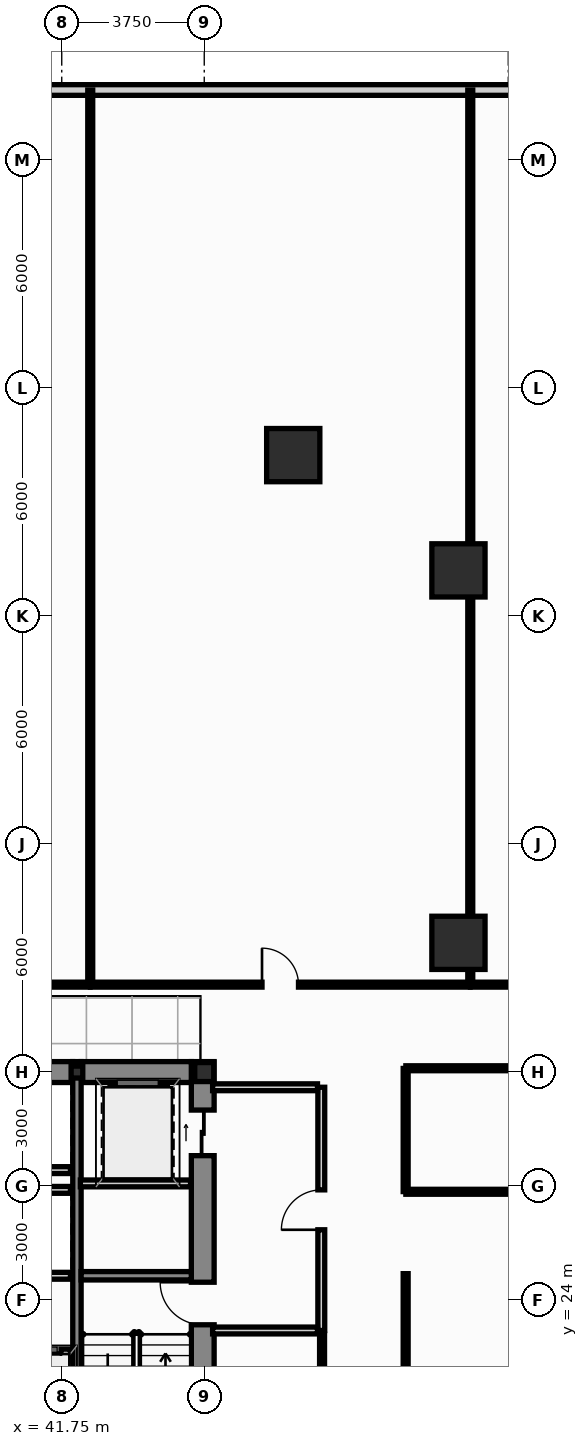
"""IFC4 building model, lengths in metres.
Left out: names, types, materials, properties, quantities, classifications, styles, units other than length and angle.
Written with IfcOpenShell. Run it as: python <this file> out.ifc"""

import sys

from ifc_helpers import new_model, si_unit, direction, frame, frame_2d, origin, origin_2d, place, context, subcontext, project, spatial, rectangle, hollow_rectangle, i_section, extrude, source, transform, mapped, element, fill, save


model = new_model("IFC4")
c1 = context("Model", 3, precision=1e-05, world=origin(), true_north=direction((0.0, 1.0)))
c2 = subcontext(c1, "Body", "Model", "MODEL_VIEW")
j1 = project(units=[si_unit("LENGTHUNIT", "METRE"), si_unit("PLANEANGLEUNIT", "RADIAN")], contexts=[c1])
p1 = place(None, origin())
s1 = spatial("IfcSite", under=j1, at=p1, CompositionType="ELEMENT")
p2 = place(p1, origin())
s2 = spatial("IfcBuilding", under=s1, at=p2, CompositionType="ELEMENT")
p3 = place(p2, frame((0.0, 0.0, 5.4)))
s3 = spatial("IfcBuildingStorey", under=s2, at=p3, CompositionType="ELEMENT", Elevation=5.4)
m1 = source(origin(), c2, "Body", "SweptSolid", [
    extrude(i_section(OverallWidth=0.5, OverallDepth=0.5, WebThickness=0.028, FlangeThickness=0.04, at=origin_2d()), origin(), (0.0, 0.0, 1.0), 4.8),
])
p4 = place(p3, frame((45.5, 30.0, 0.0), z_axis=(0.0, 0.0, 1.0), x_axis=(1.0, 0.0, 0.0)))
e1 = element("IfcColumn", 1, at=p4, inside=s3, PredefinedType="COLUMN", context=c2, shape_type="MappedRepresentation", body=[
    mapped(m1, transform((0.0, 0.0, 0.0), scale=1.0)),
])
m2 = source(origin(), c2, "Body", "SweptSolid", [
    extrude(i_section(OverallWidth=0.307, OverallDepth=0.315, WebThickness=0.012, FlangeThickness=0.019, at=origin_2d()), origin(), (0.0, 0.0, 1.0), 4.8),
])
p5 = place(p3, frame((42.15, 30.0, 0.0), z_axis=(0.0, 0.0, 1.0), x_axis=(1.0, 0.0, 0.0)))
e2 = element("IfcColumn", 2, at=p5, inside=s3, PredefinedType="COLUMN", context=c2, shape_type="MappedRepresentation", body=[
    mapped(m2, transform((0.0, 0.0, 0.0), scale=1.0)),
])
p6 = place(p3, frame((45.46, 16.85, 0.0), z_axis=(0.0, 0.0, 1.0), x_axis=(0.0, 1.0, 0.0)))
e3 = element("IfcWall", 3, at=p6, inside=s3, PredefinedType="SHEAR", context=c2, shape_type="SweptSolid", body=[
    extrude(rectangle(XDim=13.425, YDim=0.6, at=frame_2d((6.712, 0.0))), origin(), (0.0, 0.0, 1.0), 4.8),
])
p7 = place(p6, frame((6.5, 0.0, 0.0)))
e4 = element("IfcOpeningElement", 4, at=p7, cuts=e3, PredefinedType="OPENING", context=c2, shape_type="SweptSolid", body=[
    extrude(rectangle(XDim=1.12, YDim=2.15, at=frame_2d((0.56, 1.075))), frame((0.0, 0.312, 0.0), z_axis=(0.0, -1.0, 0.0), x_axis=(1.0, 0.0, 0.0)), (0.0, 0.0, 1.0), 0.624),
])
p8 = place(p6, frame((10.95, 0.0, 0.0)))
e5 = element("IfcOpeningElement", 5, at=p8, cuts=e3, PredefinedType="OPENING", context=c2, shape_type="SweptSolid", body=[
    extrude(rectangle(XDim=1.2, YDim=2.2, at=frame_2d((0.6, 1.1))), frame((0.0, 0.312, 0.0), z_axis=(0.0, -1.0, 0.0), x_axis=(1.0, 0.0, 0.0)), (0.0, 0.0, 1.0), 0.624),
])
p9 = place(p3, frame((40.16, 30.0, 0.0), z_axis=(0.0, 0.0, 1.0), x_axis=(1.0, 0.0, 0.0)))
e6 = element("IfcWall", 6, at=p9, inside=s3, PredefinedType="SHEAR", context=c2, shape_type="SweptSolid", body=[
    extrude(rectangle(XDim=1.88, YDim=0.55, at=frame_2d((0.94, 0.0))), origin(), (0.0, 0.0, 1.0), 4.8),
])
p10 = place(p3, frame((42.26, 30.0, 0.0), z_axis=(0.0, 0.0, 1.0), x_axis=(1.0, 0.0, 0.0)))
e7 = element("IfcWall", 7, at=p10, inside=s3, PredefinedType="SHEAR", context=c2, shape_type="SweptSolid", body=[
    extrude(rectangle(XDim=2.9, YDim=0.55, at=frame_2d((1.45, 0.0))), origin(), (0.0, 0.0, 1.0), 4.8),
])
p11 = place(p3, frame((42.15, 16.85, 0.0), z_axis=(0.0, 0.0, 1.0), x_axis=(0.0, 1.0, 0.0)))
e8 = element("IfcWall", 8, at=p11, inside=s3, PredefinedType="SHEAR", context=c2, shape_type="SweptSolid", body=[
    extrude(rectangle(XDim=13.425, YDim=0.22, at=frame_2d((6.712, 0.0))), origin(), (0.0, 0.0, 1.0), 4.8),
])
p12 = place(p3, frame((42.26, 24.64, 0.0), z_axis=(0.0, 0.0, 1.0), x_axis=(1.0, 0.0, 0.0)))
e9 = element("IfcWall", 9, at=p12, inside=s3, PredefinedType="SHEAR", context=c2, shape_type="SweptSolid", body=[
    extrude(rectangle(XDim=2.9, YDim=0.22, at=frame_2d((1.45, 0.0))), origin(), (0.0, 0.0, 1.0), 4.8),
])
m3 = source(origin(), c2, "Body", "SweptSolid", [
    extrude(hollow_rectangle(XDim=1.4, YDim=1.4, WallThickness=0.08, at=origin_2d()), origin(), (0.0, 0.0, 1.0), 4.802),
])
p13 = place(p3, frame((47.842, 46.233, 0.0), z_axis=(-0.023847509135, 0.001779664861, 0.999714023659), x_axis=(-0.074419924822, -0.99722699261, 0.0)))
e10 = element("IfcColumn", 10, at=p13, inside=s3, PredefinedType="COLUMN", context=c2, shape_type="MappedRepresentation", body=[
    mapped(m3, transform((0.0, 0.0, 0.0), scale=1.0)),
])
m4 = source(origin(), c2, "Body", "SweptSolid", [
    extrude(hollow_rectangle(XDim=1.4, YDim=1.4, WallThickness=0.08, at=origin_2d()), origin(), (0.0, 0.0, 1.0), 4.8),
])
for number, where, z_axis, x_axis in (
    (11, (52.189, 33.4, 0.0), (0.0, 0.0, 1.0), (1.0, 0.0, 0.0)),
    (12, (52.189, 43.2, 0.0), (0.0, 0.0, 1.0), (1.0, 0.0, 0.0)),
):
    element("IfcColumn", number, at=place(p3, frame(where, z_axis=z_axis, x_axis=x_axis)), inside=s3, PredefinedType="COLUMN", context=c2, shape_type="MappedRepresentation", body=[
        mapped(m4, transform((0.0, 0.0, 0.0), scale=1.0)),
    ])
p14 = place(p3, frame((5.086, 55.84, 0.0), z_axis=(0.0, 0.0, 1.0), x_axis=(1.0, 0.0, 0.0)))
e13 = element("IfcWall", 13, at=p14, inside=s3, PredefinedType="STANDARD", context=c2, shape_type="SweptSolid", body=[
    extrude(rectangle(XDim=71.828, YDim=0.28, at=frame_2d((35.914, 0.0))), origin(), (0.0, 0.0, 1.0), 4.48),
])
p15 = place(p3, frame((40.28, 22.62, 0.0), z_axis=(0.0, 0.0, 1.0), x_axis=(1.0, 0.0, 0.0)))
e14 = element("IfcWall", 14, at=p15, inside=s3, PredefinedType="PARTITIONING", context=c2, shape_type="SweptSolid", body=[
    extrude(rectangle(XDim=1.7, YDim=0.18, at=frame_2d((0.85, 0.0))), origin(), (0.0, 0.0, 1.0), 4.48),
])
p16 = place(p15, frame((0.35, 0.0, 0.0)))
e15 = element("IfcOpeningElement", 15, at=p16, cuts=e14, PredefinedType="OPENING", context=c2, shape_type="SweptSolid", body=[
    extrude(rectangle(XDim=1.1, YDim=2.2, at=frame_2d((0.55, 1.1))), frame((0.0, 0.102, 0.0), z_axis=(0.0, -1.0, 0.0), x_axis=(1.0, 0.0, 0.0)), (0.0, 0.0, 1.0), 0.204),
])
p17 = place(p3, frame((40.28, 26.9, 0.0), z_axis=(0.0, 0.0, 1.0), x_axis=(1.0, 0.0, 0.0)))
e16 = element("IfcWall", 16, at=p17, inside=s3, PredefinedType="PARTITIONING", context=c2, shape_type="SweptSolid", body=[
    extrude(rectangle(XDim=1.7, YDim=0.18, at=frame_2d((0.85, 0.0))), origin(), (0.0, 0.0, 1.0), 4.48),
])
p18 = place(p3, frame((40.2, 24.64, 0.0), z_axis=(0.0, 0.0, 1.0), x_axis=(1.0, 0.0, 0.0)))
e17 = element("IfcWall", 17, at=p18, inside=s3, PredefinedType="PARTITIONING", context=c2, shape_type="SweptSolid", body=[
    extrude(rectangle(XDim=1.78, YDim=0.18, at=frame_2d((0.89, 0.0))), origin(), (0.0, 0.0, 1.0), 4.48),
])
p19 = place(p3, frame((40.22, 27.42, 0.0), z_axis=(0.0, 0.0, 1.0), x_axis=(1.0, 0.0, 0.0)))
e18 = element("IfcWall", 18, at=p19, inside=s3, PredefinedType="PARTITIONING", context=c2, shape_type="SweptSolid", body=[
    extrude(rectangle(XDim=1.76, YDim=0.18, at=frame_2d((0.88, 0.0))), origin(), (0.0, 0.0, 1.0), 4.48),
])
p20 = place(p3, frame((48.58, 23.2, 0.0), z_axis=(0.0, 0.0, 1.0), x_axis=(0.0, 1.0, 0.0)))
e19 = element("IfcWall", 19, at=p20, inside=s3, PredefinedType="PARTITIONING", context=c2, shape_type="SweptSolid", body=[
    extrude(rectangle(XDim=6.4, YDim=0.18, at=frame_2d((3.2, 0.0))), origin(), (0.0, 0.0, 1.0), 4.48),
])
p21 = place(p20, frame((2.65, 0.0, 0.0)))
e20 = element("IfcOpeningElement", 20, at=p21, cuts=e19, PredefinedType="OPENING", context=c2, shape_type="SweptSolid", body=[
    extrude(rectangle(XDim=1.05, YDim=2.15, at=frame_2d((0.525, 1.075))), frame((0.0, 0.102, 0.0), z_axis=(0.0, -1.0, 0.0), x_axis=(1.0, 0.0, 0.0)), (0.0, 0.0, 1.0), 0.204),
])
p22 = place(p3, frame((45.72, 23.2, 0.0), z_axis=(0.0, 0.0, 1.0), x_axis=(1.0, 0.0, 0.0)))
e21 = element("IfcWall", 21, at=p22, inside=s3, PredefinedType="PARTITIONING", context=c2, shape_type="SweptSolid", body=[
    extrude(rectangle(XDim=2.76, YDim=0.18, at=frame_2d((1.38, 0.0))), origin(), (0.0, 0.0, 1.0), 4.48),
])
p23 = place(p3, frame((45.72, 29.6, 0.0), z_axis=(0.0, 0.0, 1.0), x_axis=(1.0, 0.0, 0.0)))
e22 = element("IfcWall", 22, at=p23, inside=s3, PredefinedType="PARTITIONING", context=c2, shape_type="SweptSolid", body=[
    extrude(rectangle(XDim=2.76, YDim=0.18, at=frame_2d((1.38, 0.0))), origin(), (0.0, 0.0, 1.0), 3.854),
])
p24 = place(p3, frame((42.24, 27.07, 0.0), z_axis=(0.0, 0.0, 1.0), x_axis=(1.0, 0.0, 0.0)))
e23 = element("IfcWall", 23, at=p24, inside=s3, PredefinedType="PARTITIONING", context=c2, shape_type="SweptSolid", body=[
    extrude(rectangle(XDim=2.9, YDim=0.18, at=frame_2d((1.45, 0.0))), origin(), (0.0, 0.0, 1.0), 4.48),
])
p25 = place(p3, frame((52.5, 32.305, 0.0), z_axis=(0.0, 0.0, 1.0), x_axis=(0.0, 1.0, 0.0)))
e24 = element("IfcWall", 24, at=p25, inside=s3, PredefinedType="PARTITIONING", context=c2, shape_type="SweptSolid", body=[
    extrude(rectangle(XDim=23.535, YDim=0.13, at=frame_2d((11.768, 0.0))), origin(), (0.0, 0.0, 1.0), 3.465),
])
p26 = place(p3, frame((42.5, 32.305, 0.0), z_axis=(0.0, 0.0, 1.0), x_axis=(0.0, 1.0, 0.0)))
e25 = element("IfcWall", 25, at=p26, inside=s3, PredefinedType="PARTITIONING", context=c2, shape_type="SweptSolid", body=[
    extrude(rectangle(XDim=23.535, YDim=0.13, at=frame_2d((11.768, 0.0))), origin(), (0.0, 0.0, 1.0), 4.48),
])
p27 = place(p3, frame((26.205, 32.3, 0.0), z_axis=(0.0, 0.0, 1.0), x_axis=(1.0, 0.0, 0.0)))
e26 = element("IfcWall", 26, at=p27, inside=s3, PredefinedType="PARTITIONING", context=c2, shape_type="SweptSolid", body=[
    extrude(rectangle(XDim=16.29, YDim=0.13, at=frame_2d((8.145, 0.0))), origin(), (0.0, 0.0, 1.0), 4.48),
])
p28 = place(p27, frame((7.665, 0.0, 0.0)))
e27 = element("IfcOpeningElement", 27, at=p28, cuts=e26, PredefinedType="OPENING", context=c2, shape_type="SweptSolid", body=[
    extrude(rectangle(XDim=0.96, YDim=2.15, at=frame_2d((0.48, 1.075))), frame((0.0, 0.077, 0.0), z_axis=(0.0, -1.0, 0.0), x_axis=(1.0, 0.0, 0.0)), (0.0, 0.0, 1.0), 0.154),
])
p29 = place(p3, frame((61.495, 30.1, 0.0), z_axis=(0.0, 0.0, 1.0), x_axis=(-1.0, 0.0, 0.0)))
e28 = element("IfcWall", 28, at=p29, inside=s3, PredefinedType="PARTITIONING", context=c2, shape_type="SweptSolid", body=[
    extrude(rectangle(XDim=10.69, YDim=0.13, at=frame_2d((5.345, 0.0))), origin(), (0.0, 0.0, 1.0), 3.854),
])
p30 = place(p29, frame((5.22, 0.0, 0.0)))
e29 = element("IfcOpeningElement", 29, at=p30, cuts=e28, PredefinedType="OPENING", context=c2, shape_type="SweptSolid", body=[
    extrude(rectangle(XDim=0.96, YDim=2.15, at=frame_2d((0.48, 1.075))), frame((0.0, 0.077, 0.0), z_axis=(0.0, -1.0, 0.0), x_axis=(1.0, 0.0, 0.0)), (0.0, 0.0, 1.0), 0.154),
])
p31 = place(p3, frame((42.505, 32.3, 0.0), z_axis=(0.0, 0.0, 1.0), x_axis=(1.0, 0.0, 0.0)))
e30 = element("IfcWall", 30, at=p31, inside=s3, PredefinedType="PARTITIONING", context=c2, shape_type="SweptSolid", body=[
    extrude(rectangle(XDim=9.99, YDim=0.13, at=frame_2d((4.995, 0.0))), origin(), (0.0, 0.0, 1.0), 4.48),
])
p32 = place(p31, frame((4.515, 0.0, 0.0)))
e31 = element("IfcOpeningElement", 31, at=p32, cuts=e30, PredefinedType="OPENING", context=c2, shape_type="SweptSolid", body=[
    extrude(rectangle(XDim=0.96, YDim=2.15, at=frame_2d((0.48, 1.075))), frame((0.0, 0.077, 0.0), z_axis=(0.0, -1.0, 0.0), x_axis=(1.0, 0.0, 0.0)), (0.0, 0.0, 1.0), 0.154),
])
p33 = place(p3, frame((52.505, 32.3, 0.0), z_axis=(0.0, 0.0, 1.0), x_axis=(1.0, 0.0, 0.0)))
e32 = element("IfcWall", 32, at=p33, inside=s3, PredefinedType="PARTITIONING", context=c2, shape_type="SweptSolid", body=[
    extrude(rectangle(XDim=8.99, YDim=0.13, at=frame_2d((4.495, 0.0))), origin(), (0.0, 0.0, 1.0), 4.48),
])
p34 = place(p3, frame((48.6, 14.355, 0.0), z_axis=(0.0, 0.0, 1.0), x_axis=(0.0, 1.0, 0.0)))
e33 = element("IfcWall", 33, at=p34, inside=s3, PredefinedType="PARTITIONING", context=c2, shape_type="SweptSolid", body=[
    extrude(rectangle(XDim=8.75, YDim=0.13, at=frame_2d((4.375, 0.0))), origin(), (0.0, 0.0, 1.0), 4.48),
])
p35 = place(p3, frame((50.805, 26.85, 0.0), z_axis=(0.0, 0.0, 1.0), x_axis=(1.0, 0.0, 0.0)))
e34 = element("IfcWall", 34, at=p35, inside=s3, PredefinedType="PARTITIONING", context=c2, shape_type="SweptSolid", body=[
    extrude(rectangle(XDim=8.49, YDim=0.13, at=frame_2d((4.245, 0.0))), origin(), (0.0, 0.0, 1.0), 4.48),
])
p36 = place(p3, frame((50.8, 24.695, 0.0), z_axis=(0.0, 0.0, 1.0), x_axis=(0.0, -1.0, 0.0)))
e35 = element("IfcWall", 35, at=p36, inside=s3, PredefinedType="PARTITIONING", context=c2, shape_type="SweptSolid", body=[
    extrude(rectangle(XDim=5.19, YDim=0.13, at=frame_2d((2.595, 0.0))), origin(), (0.0, 0.0, 1.0), 4.48),
])
p37 = place(p3, frame((50.8, 30.095, 0.0), z_axis=(0.0, 0.0, 1.0), x_axis=(0.0, -1.0, 0.0)))
e36 = element("IfcWall", 36, at=p37, inside=s3, PredefinedType="PARTITIONING", context=c2, shape_type="SweptSolid", body=[
    extrude(rectangle(XDim=3.24, YDim=0.13, at=frame_2d((1.62, 0.0))), origin(), (0.0, 0.0, 1.0), 4.48),
])
p38 = place(p7, origin())
e37 = element("IfcDoor", 37, at=p38, inside=s3, OperationType="SINGLE_SWING_RIGHT", PredefinedType="DOOR", context=c2, shape_type="SweptSolid", body=[
    extrude(rectangle(XDim=1.12, YDim=2.15, at=frame_2d((0.56, 1.075))), frame((0.0, 0.025, 0.0), z_axis=(0.0, -1.0, 0.0), x_axis=(1.0, 0.0, 0.0)), (0.0, 0.0, 1.0), 0.05),
])
fill(e4, e37)
p39 = place(p8, origin())
e38 = element("IfcDoor", 38, at=p39, inside=s3, OperationType="SLIDING_TO_RIGHT", PredefinedType="DOOR", context=c2, shape_type="SweptSolid", body=[
    extrude(rectangle(XDim=1.2, YDim=2.2, at=frame_2d((0.6, 1.1))), frame((0.0, 0.025, 0.0), z_axis=(0.0, -1.0, 0.0), x_axis=(1.0, 0.0, 0.0)), (0.0, 0.0, 1.0), 0.05),
])
fill(e5, e38)
p40 = place(p16, origin())
e39 = element("IfcDoor", 39, at=p40, inside=s3, OperationType="SLIDING_TO_LEFT", PredefinedType="DOOR", context=c2, shape_type="SweptSolid", body=[
    extrude(rectangle(XDim=1.1, YDim=2.2, at=frame_2d((0.55, 1.1))), frame((0.0, 0.025, 0.0), z_axis=(0.0, -1.0, 0.0), x_axis=(1.0, 0.0, 0.0)), (0.0, 0.0, 1.0), 0.05),
])
fill(e15, e39)
p41 = place(p21, origin())
e40 = element("IfcDoor", 40, at=p41, inside=s3, OperationType="SINGLE_SWING_LEFT", PredefinedType="DOOR", context=c2, shape_type="SweptSolid", body=[
    extrude(rectangle(XDim=1.05, YDim=2.15, at=frame_2d((0.525, 1.075))), frame((0.0, 0.025, 0.0), z_axis=(0.0, -1.0, 0.0), x_axis=(1.0, 0.0, 0.0)), (0.0, 0.0, 1.0), 0.05),
])
fill(e20, e40)
p42 = place(p32, origin())
e41 = element("IfcDoor", 41, at=p42, inside=s3, OperationType="SINGLE_SWING_LEFT", PredefinedType="DOOR", context=c2, shape_type="SweptSolid", body=[
    extrude(rectangle(XDim=0.96, YDim=2.15, at=frame_2d((0.48, 1.075))), frame((0.0, 0.025, 0.0), z_axis=(0.0, -1.0, 0.0), x_axis=(1.0, 0.0, 0.0)), (0.0, 0.0, 1.0), 0.05),
])
fill(e31, e41)
save(model, sys.argv[1])
